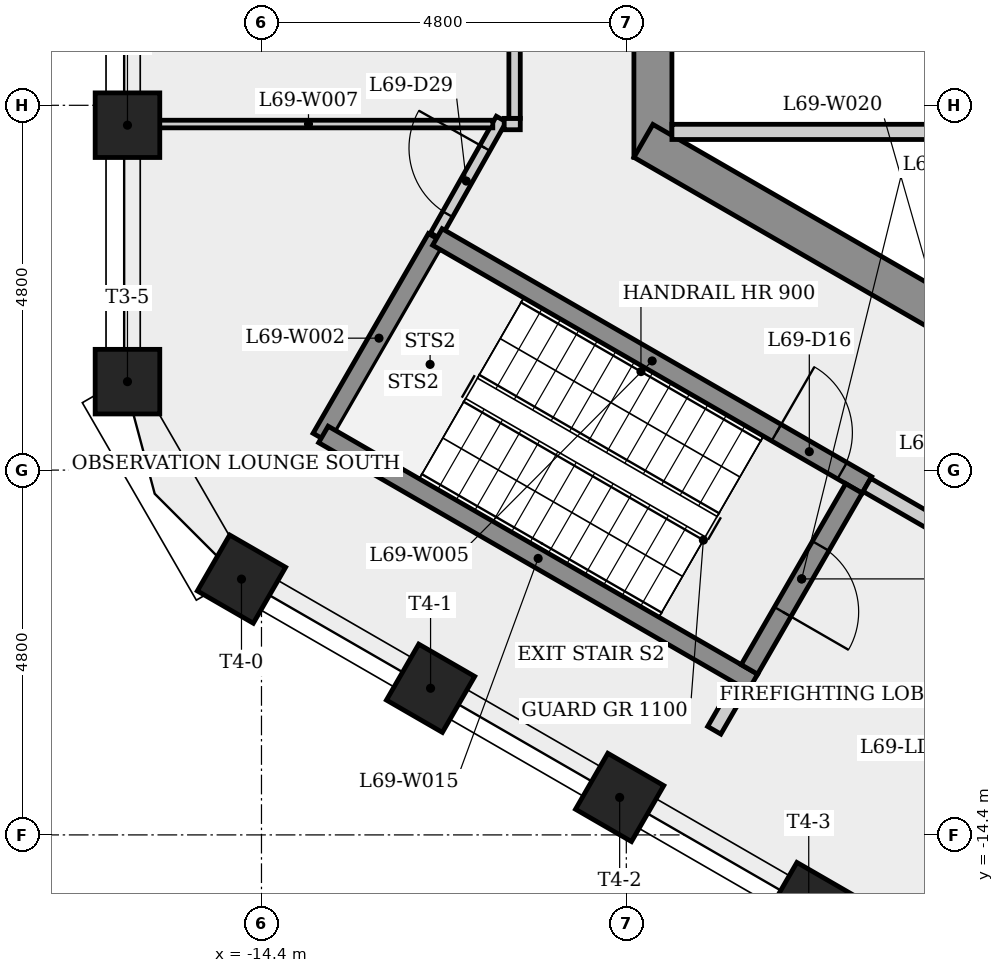
"""IFC4 building model, lengths in metres.
Left out: names, types, materials, properties, quantities, classifications, styles, units other than length and angle.
Written with IfcOpenShell. Run it as: python <this file> out.ifc"""

import sys

from ifc_helpers import new_model, si_unit, direction, frame, frame_2d, origin, origin_2d, place, context, subcontext, project, spatial, rectangle, extrude, element, fill, save


model = new_model("IFC4")
c1 = context("Model", 3, precision=1e-05, world=origin(), true_north=direction((0.0, 1.0)))
c2 = subcontext(c1, "Body", "Model", "MODEL_VIEW")
j1 = project(units=[si_unit("LENGTHUNIT", "METRE"), si_unit("PLANEANGLEUNIT", "RADIAN")], contexts=[c1])
p1 = place(None, origin())
s1 = spatial("IfcSite", under=j1, at=p1, CompositionType="ELEMENT")
p2 = place(p1, origin())
s2 = spatial("IfcBuilding", under=s1, at=p2, CompositionType="ELEMENT")
p3 = place(p2, frame((0.0, 0.0, 257.9)))
s3 = spatial("IfcBuildingStorey", under=s2, at=p3, CompositionType="ELEMENT", Elevation=257.9)
p4 = place(p3, frame((-9.25, 5.485, 0.0), z_axis=(0.0, 0.0, 1.0), x_axis=(0.0, -1.0, 0.0)))
e1 = element("IfcWall", 1, at=p4, inside=s3, PredefinedType="SHEAR", context=c2, shape_type="SweptSolid", body=[
    extrude(rectangle(XDim=10.97, YDim=0.5, at=frame_2d((5.485, 0.0))), origin(), (0.0, 0.0, 1.0), 5.0),
])
p5 = place(p4, frame((8.51, 0.0, 0.0)))
e2 = element("IfcOpeningElement", 2, at=p5, cuts=e1, PredefinedType="OPENING", context=c2, shape_type="SweptSolid", body=[
    extrude(rectangle(XDim=0.9, YDim=2.1, at=frame_2d((0.45, 1.05))), frame((0.0, 0.26, 0.0), z_axis=(0.0, -1.0, 0.0), x_axis=(1.0, 0.0, 0.0)), (0.0, 0.0, 1.0), 0.52),
])
p6 = place(p4, frame((4.685, 0.0, 0.0)))
e3 = element("IfcOpeningElement", 3, at=p6, cuts=e1, PredefinedType="OPENING", context=c2, shape_type="SweptSolid", body=[
    extrude(rectangle(XDim=1.6, YDim=2.1, at=frame_2d((0.8, 1.05))), frame((0.0, 0.26, 0.0), z_axis=(0.0, -1.0, 0.0), x_axis=(1.0, 0.0, 0.0)), (0.0, 0.0, 1.0), 0.52),
])
p7 = place(p3, frame((-9.375, -5.268, 0.0), z_axis=(0.0, 0.0, 1.0), x_axis=(0.866023993627, -0.500002442456, 0.0)))
e4 = element("IfcWall", 4, at=p7, inside=s3, PredefinedType="SHEAR", context=c2, shape_type="SweptSolid", body=[
    extrude(rectangle(XDim=10.97, YDim=0.5, at=frame_2d((5.485, 0.0))), origin(), (0.0, 0.0, 1.0), 5.0),
])
p8 = place(p7, frame((5.011, 0.0, 0.0)))
e5 = element("IfcOpeningElement", 5, at=p8, cuts=e4, PredefinedType="OPENING", context=c2, shape_type="SweptSolid", body=[
    extrude(rectangle(XDim=0.9, YDim=2.1, at=frame_2d((0.45, 1.05))), frame((0.0, 0.26, 0.0), z_axis=(0.0, -1.0, 0.0), x_axis=(1.0, 0.0, 0.0)), (0.0, 0.0, 1.0), 0.52),
])
for number, where, z_axis, x_axis in (
    (6, (-16.163, -5.062, 0.0), (0.0, 0.0, 1.0), (-1.0, 0.0, 0.0)),
    (7, (-16.163, -8.436, 0.0), (0.0, 0.0, 1.0), (-1.0, 0.0, 0.0)),
    (8, (-14.663, -11.034, 0.0), (0.0, 0.0, 1.0), (-0.5, -0.866, 0.0)),
    (9, (-12.175, -12.47, 0.0), (0.0, 0.0, 1.0), (-0.5, -0.866, 0.0)),
    (10, (-9.688, -13.907, 0.0), (0.0, 0.0, 1.0), (-0.5, -0.866, 0.0)),
    (11, (-7.2, -15.343, 0.0), (0.0, 0.0, 1.0), (-0.5, -0.866, 0.0)),
):
    element("IfcColumn", number, at=place(p3, frame(where, z_axis=z_axis, x_axis=x_axis)), inside=s3, PredefinedType="COLUMN", context=c2, shape_type="SweptSolid", body=[
        extrude(rectangle(XDim=0.85, YDim=0.85, at=origin_2d()), origin(), (0.0, 0.0, 1.0), 5.0),
    ])
p9 = place(p3, frame((-13.613, -9.178, 0.0), z_axis=(0.0, 0.0, 1.0), x_axis=(0.499954569122, 0.866051631725, 0.0)))
e12 = element("IfcWall", 12, at=p9, inside=s3, PredefinedType="SHEAR", context=c2, shape_type="SweptSolid", body=[
    extrude(rectangle(XDim=3.035, YDim=0.25, at=frame_2d((1.518, 0.0))), origin(), (0.0, 0.0, 1.0), 4.6),
])
p10 = place(p3, frame((-12.111, -6.518, 0.0), z_axis=(0.0, 0.0, 1.0), x_axis=(0.491226952913, 0.871031618675, 0.0)))
e13 = element("IfcWall", 13, at=p10, inside=s3, PredefinedType="PARTITIONING", context=c2, shape_type="SweptSolid", body=[
    extrude(rectangle(XDim=1.764, YDim=0.15, at=frame_2d((0.882, 0.0))), origin(), (0.0, 0.0, 1.0), 4.6),
])
p11 = place(p10, frame((0.327, 0.0, 0.0)))
e14 = element("IfcOpeningElement", 14, at=p11, cuts=e13, PredefinedType="OPENING", context=c2, shape_type="SweptSolid", body=[
    extrude(rectangle(XDim=1.0, YDim=2.1, at=frame_2d((0.5, 1.05))), frame((0.0, 0.085, 0.0), z_axis=(0.0, -1.0, 0.0), x_axis=(1.0, 0.0, 0.0)), (0.0, 0.0, 1.0), 0.17),
])
p12 = place(p3, frame((-12.085, -6.532, 0.0), z_axis=(0.0, 0.0, 1.0), x_axis=(0.866031063448, -0.499990197047, 0.0)))
e15 = element("IfcWall", 15, at=p12, inside=s3, PredefinedType="SHEAR", context=c2, shape_type="SweptSolid", body=[
    extrude(rectangle(XDim=6.525, YDim=0.25, at=frame_2d((3.263, 0.0))), origin(), (0.0, 0.0, 1.0), 4.6),
])
p13 = place(p12, frame((5.15, 0.0, 0.0)))
e16 = element("IfcOpeningElement", 16, at=p13, cuts=e15, PredefinedType="OPENING", context=c2, shape_type="SweptSolid", body=[
    extrude(rectangle(XDim=1.0, YDim=2.1, at=frame_2d((0.5, 1.05))), frame((0.0, 0.135, 0.0), z_axis=(0.0, -1.0, 0.0), x_axis=(1.0, 0.0, 0.0)), (0.0, 0.0, 1.0), 0.27),
])
p14 = place(p3, frame((-11.207, -5.047, 0.0), z_axis=(0.0, 0.0, 1.0), x_axis=(1.0, 0.0, 0.0)))
e17 = element("IfcWall", 17, at=p14, inside=s3, PredefinedType="PARTITIONING", context=c2, shape_type="SweptSolid", body=[
    extrude(rectangle(XDim=0.211, YDim=0.15, at=frame_2d((0.106, 0.0))), origin(), (0.0, 0.0, 1.0), 4.6),
])
p15 = place(p3, frame((-11.356, -5.047, 0.0), z_axis=(0.0, 0.0, 1.0), x_axis=(-1.0, 0.0, 0.0)))
e18 = element("IfcWall", 18, at=p15, inside=s3, PredefinedType="PARTITIONING", context=c2, shape_type="SweptSolid", body=[
    extrude(rectangle(XDim=4.85, YDim=0.1, at=frame_2d((2.425, 0.0))), origin(), (0.0, 0.0, 1.0), 4.6),
])
p16 = place(p3, frame((-11.07, -4.972, 0.0), z_axis=(0.0, 0.0, 1.0), x_axis=(0.0, 1.0, 0.0)))
e19 = element("IfcWall", 19, at=p16, inside=s3, PredefinedType="PARTITIONING", context=c2, shape_type="SweptSolid", body=[
    extrude(rectangle(XDim=9.943, YDim=0.15, at=frame_2d((4.972, 0.0))), origin(), (0.0, 0.0, 1.0), 4.6),
])
p17 = place(p16, frame((4.472, 0.0, 0.0)))
e20 = element("IfcOpeningElement", 20, at=p17, cuts=e19, PredefinedType="OPENING", context=c2, shape_type="SweptSolid", body=[
    extrude(rectangle(XDim=1.0, YDim=2.1, at=frame_2d((0.5, 1.05))), frame((0.0, 0.085, 0.0), z_axis=(0.0, -1.0, 0.0), x_axis=(1.0, 0.0, 0.0)), (0.0, 0.0, 1.0), 0.17),
])
p18 = place(p3, frame((-9.0, -5.15, 0.0), z_axis=(0.0, 0.0, 1.0), x_axis=(1.0, 0.0, 0.0)))
e21 = element("IfcWall", 21, at=p18, inside=s3, PredefinedType="PARTITIONING", context=c2, shape_type="SweptSolid", body=[
    extrude(rectangle(XDim=11.325, YDim=0.2, at=frame_2d((5.663, 0.0))), origin(), (0.0, 0.0, 1.0), 4.6),
])
p19 = place(p3, frame((-8.443, -13.023, 0.0), z_axis=(0.0, 0.0, 1.0), x_axis=(0.500066738792, 0.865986868696, 0.0)))
e22 = element("IfcWall", 22, at=p19, inside=s3, PredefinedType="PARTITIONING", context=c2, shape_type="SweptSolid", body=[
    extrude(rectangle(XDim=0.675, YDim=0.2, at=frame_2d((0.338, 0.0))), origin(), (0.0, 0.0, 1.0), 4.6),
])
p20 = place(p3, frame((-7.935, -12.393, 0.0), z_axis=(0.0, 0.0, 1.0), x_axis=(-0.866031063448, 0.499990197047, 0.0)))
e23 = element("IfcWall", 23, at=p20, inside=s3, PredefinedType="SHEAR", context=c2, shape_type="SweptSolid", body=[
    extrude(rectangle(XDim=6.525, YDim=0.25, at=frame_2d((3.263, 0.0))), origin(), (0.0, 0.0, 1.0), 4.6),
])
p21 = place(p3, frame((-6.605, -9.841, 0.0), z_axis=(0.0, 0.0, 1.0), x_axis=(-0.499996545922, -0.866027397988, 0.0)))
e24 = element("IfcWall", 24, at=p21, inside=s3, PredefinedType="SHEAR", context=c2, shape_type="SweptSolid", body=[
    extrude(rectangle(XDim=2.75, YDim=0.25, at=frame_2d((1.375, 0.0))), origin(), (0.0, 0.0, 1.0), 4.6),
])
p22 = place(p21, frame((0.875, 0.0, 0.0)))
e25 = element("IfcOpeningElement", 25, at=p22, cuts=e24, PredefinedType="OPENING", context=c2, shape_type="SweptSolid", body=[
    extrude(rectangle(XDim=1.0, YDim=2.1, at=frame_2d((0.5, 1.05))), frame((0.0, 0.135, 0.0), z_axis=(0.0, -1.0, 0.0), x_axis=(1.0, 0.0, 0.0)), (0.0, 0.0, 1.0), 0.27),
])
p23 = place(p3, frame((-6.435, -9.795, 0.0), z_axis=(0.0, 0.0, 1.0), x_axis=(0.866012907634, -0.500021643343, 0.0)))
e26 = element("IfcWall", 26, at=p23, inside=s3, PredefinedType="PARTITIONING", context=c2, shape_type="SweptSolid", body=[
    extrude(rectangle(XDim=4.45, YDim=0.2, at=frame_2d((2.225, 0.0))), origin(), (0.0, 0.0, 1.0), 4.6),
])
p24 = place(p23, frame((1.675, 0.0, 0.0)))
e27 = element("IfcOpeningElement", 27, at=p24, cuts=e26, PredefinedType="OPENING", context=c2, shape_type="SweptSolid", body=[
    extrude(rectangle(XDim=1.1, YDim=2.1, at=frame_2d((0.55, 1.05))), frame((0.0, 0.11, 0.0), z_axis=(0.0, -1.0, 0.0), x_axis=(1.0, 0.0, 0.0)), (0.0, 0.0, 1.0), 0.22),
])
p25 = place(p13, origin())
e28 = element("IfcDoor", 28, at=p25, inside=s3, OperationType="SINGLE_SWING_LEFT", PredefinedType="DOOR", context=c2, shape_type="SweptSolid", body=[
    extrude(rectangle(XDim=1.0, YDim=2.1, at=frame_2d((0.5, 1.05))), frame((0.0, 0.025, 0.0), z_axis=(0.0, -1.0, 0.0), x_axis=(1.0, 0.0, 0.0)), (0.0, 0.0, 1.0), 0.05),
])
fill(e16, e28)
p26 = place(p22, origin())
e29 = element("IfcDoor", 29, at=p26, inside=s3, OperationType="SINGLE_SWING_RIGHT", PredefinedType="DOOR", context=c2, shape_type="SweptSolid", body=[
    extrude(rectangle(XDim=1.0, YDim=2.1, at=frame_2d((0.5, 1.05))), frame((0.0, 0.025, 0.0), z_axis=(0.0, -1.0, 0.0), x_axis=(1.0, 0.0, 0.0)), (0.0, 0.0, 1.0), 0.05),
])
fill(e25, e29)
p27 = place(p11, origin())
e30 = element("IfcDoor", 30, at=p27, inside=s3, OperationType="SINGLE_SWING_RIGHT", PredefinedType="DOOR", context=c2, shape_type="SweptSolid", body=[
    extrude(rectangle(XDim=1.0, YDim=2.1, at=frame_2d((0.5, 1.05))), frame((0.0, 0.025, 0.0), z_axis=(0.0, -1.0, 0.0), x_axis=(1.0, 0.0, 0.0)), (0.0, 0.0, 1.0), 0.05),
])
fill(e14, e30)
save(model, sys.argv[1])
